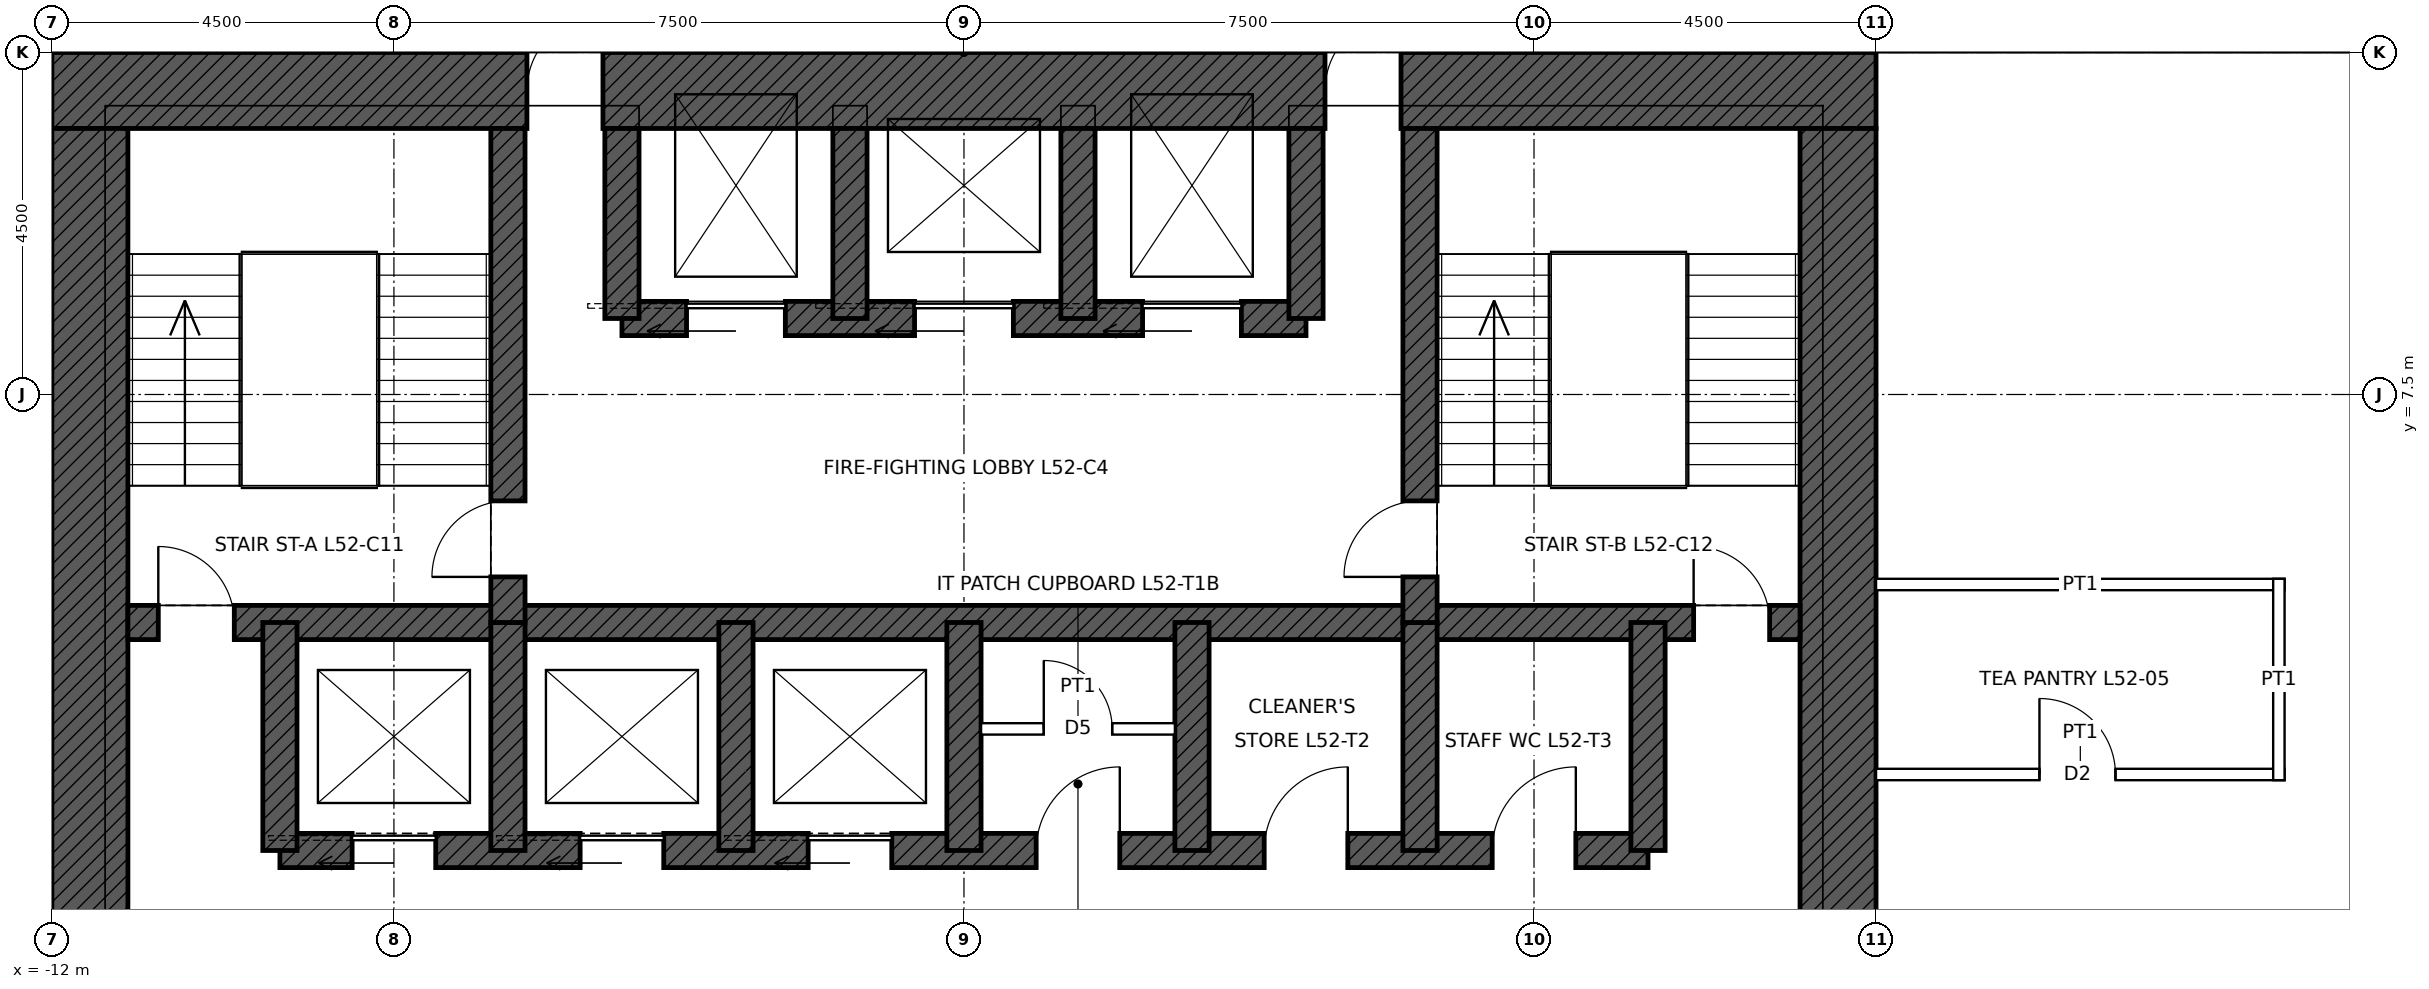
"""IFC4 building model, lengths in metres.
Left out: names, types, materials, properties, quantities, classifications, styles, units other than length and angle.
Written with IfcOpenShell. Run it as: python <this file> out.ifc"""

import sys

from ifc_helpers import new_model, si_unit, direction, frame, frame_2d, origin, place, context, subcontext, project, spatial, rectangle, extrude, element, fill, save


model = new_model("IFC4")
c1 = context("Model", 3, precision=1e-05, world=origin(), true_north=direction((0.0, 1.0)))
c2 = subcontext(c1, "Body", "Model", "MODEL_VIEW")
j1 = project(units=[si_unit("LENGTHUNIT", "METRE"), si_unit("PLANEANGLEUNIT", "RADIAN")], contexts=[c1])
p1 = place(None, origin())
s1 = spatial("IfcSite", under=j1, at=p1, CompositionType="ELEMENT")
p2 = place(p1, origin())
s2 = spatial("IfcBuilding", under=s1, at=p2, CompositionType="ELEMENT")
p3 = place(p2, frame((0.0, 0.0, 241.9)))
s3 = spatial("IfcBuildingStorey", under=s2, at=p3, CompositionType="ELEMENT", Elevation=241.9)
p4 = place(p3, frame((-12.0, 11.5, 0.0), z_axis=(0.0, 0.0, 1.0), x_axis=(1.0, 0.0, 0.0)))
e1 = element("IfcWall", 1, at=p4, inside=s3, PredefinedType="SHEAR", context=c2, shape_type="SweptSolid", body=[
    extrude(rectangle(XDim=24.0, YDim=1.0, at=frame_2d((12.0, 0.0))), origin(), (0.0, 0.0, 1.0), 4.0),
])
p5 = place(p4, frame((6.25, 0.0, 0.0)))
e2 = element("IfcOpeningElement", 2, at=p5, cuts=e1, PredefinedType="OPENING", context=c2, shape_type="SweptSolid", body=[
    extrude(rectangle(XDim=1.0, YDim=2.4, at=frame_2d((0.5, 1.2))), frame((0.0, 0.51, 0.0), z_axis=(0.0, -1.0, 0.0), x_axis=(1.0, 0.0, 0.0)), (0.0, 0.0, 1.0), 1.02),
])
p6 = place(p4, frame((16.75, 0.0, 0.0)))
e3 = element("IfcOpeningElement", 3, at=p6, cuts=e1, PredefinedType="OPENING", context=c2, shape_type="SweptSolid", body=[
    extrude(rectangle(XDim=1.0, YDim=2.4, at=frame_2d((0.5, 1.2))), frame((0.0, 0.51, 0.0), z_axis=(0.0, -1.0, 0.0), x_axis=(1.0, 0.0, 0.0)), (0.0, 0.0, 1.0), 1.02),
])
p7 = place(p3, frame((11.5, 11.0, 0.0), z_axis=(0.0, 0.0, 1.0), x_axis=(0.0, -1.0, 0.0)))
e4 = element("IfcWall", 4, at=p7, inside=s3, PredefinedType="SHEAR", context=c2, shape_type="SweptSolid", body=[
    extrude(rectangle(XDim=22.0, YDim=1.0, at=frame_2d((11.0, 0.0))), origin(), (0.0, 0.0, 1.0), 4.0),
])
p8 = place(p7, frame((10.5, 0.0, 0.0)))
e5 = element("IfcOpeningElement", 5, at=p8, cuts=e4, PredefinedType="OPENING", context=c2, shape_type="SweptSolid", body=[
    extrude(rectangle(XDim=1.0, YDim=2.4, at=frame_2d((0.5, 1.2))), frame((0.0, 0.51, 0.0), z_axis=(0.0, -1.0, 0.0), x_axis=(1.0, 0.0, 0.0)), (0.0, 0.0, 1.0), 1.02),
])
p9 = place(p3, frame((-11.5, -11.0, 0.0), z_axis=(0.0, 0.0, 1.0), x_axis=(0.0, 1.0, 0.0)))
e6 = element("IfcWall", 6, at=p9, inside=s3, PredefinedType="SHEAR", context=c2, shape_type="SweptSolid", body=[
    extrude(rectangle(XDim=22.0, YDim=1.0, at=frame_2d((11.0, 0.0))), origin(), (0.0, 0.0, 1.0), 4.0),
])
p10 = place(p9, frame((10.5, 0.0, 0.0)))
e7 = element("IfcOpeningElement", 7, at=p10, cuts=e6, PredefinedType="OPENING", context=c2, shape_type="SweptSolid", body=[
    extrude(rectangle(XDim=1.0, YDim=2.4, at=frame_2d((0.5, 1.2))), frame((0.0, 0.51, 0.0), z_axis=(0.0, -1.0, 0.0), x_axis=(1.0, 0.0, 0.0)), (0.0, 0.0, 1.0), 1.02),
])
p11 = place(p3, frame((-11.0, 4.5, 0.0), z_axis=(0.0, 0.0, 1.0), x_axis=(1.0, 0.0, 0.0)))
e8 = element("IfcWall", 8, at=p11, inside=s3, PredefinedType="SHEAR", context=c2, shape_type="SweptSolid", body=[
    extrude(rectangle(XDim=22.0, YDim=0.45, at=frame_2d((11.0, 0.0))), origin(), (0.0, 0.0, 1.0), 4.0),
])
p12 = place(p11, frame((0.4, 0.0, 0.0)))
e9 = element("IfcOpeningElement", 9, at=p12, cuts=e8, PredefinedType="OPENING", context=c2, shape_type="SweptSolid", body=[
    extrude(rectangle(XDim=1.0, YDim=2.1, at=frame_2d((0.5, 1.05))), frame((0.0, 0.235, 0.0), z_axis=(0.0, -1.0, 0.0), x_axis=(1.0, 0.0, 0.0)), (0.0, 0.0, 1.0), 0.47),
])
p13 = place(p11, frame((20.6, 0.0, 0.0)))
e10 = element("IfcOpeningElement", 10, at=p13, cuts=e8, PredefinedType="OPENING", context=c2, shape_type="SweptSolid", body=[
    extrude(rectangle(XDim=1.0, YDim=2.1, at=frame_2d((0.5, 1.05))), frame((0.0, 0.235, 0.0), z_axis=(0.0, -1.0, 0.0), x_axis=(1.0, 0.0, 0.0)), (0.0, 0.0, 1.0), 0.47),
])
p14 = place(p3, frame((-9.0, 1.5, 0.0), z_axis=(0.0, 0.0, 1.0), x_axis=(1.0, 0.0, 0.0)))
e11 = element("IfcWall", 11, at=p14, inside=s3, PredefinedType="SHEAR", context=c2, shape_type="SweptSolid", body=[
    extrude(rectangle(XDim=18.0, YDim=0.45, at=frame_2d((9.0, 0.0))), origin(), (0.0, 0.0, 1.0), 4.0),
])
p15 = place(p14, frame((0.95, 0.0, 0.0)))
e12 = element("IfcOpeningElement", 12, at=p15, cuts=e11, PredefinedType="OPENING", context=c2, shape_type="SweptSolid", body=[
    extrude(rectangle(XDim=1.1, YDim=2.1, at=frame_2d((0.55, 1.05))), frame((0.0, 0.235, 0.0), z_axis=(0.0, -1.0, 0.0), x_axis=(1.0, 0.0, 0.0)), (0.0, 0.0, 1.0), 0.47),
])
p16 = place(p14, frame((3.95, 0.0, 0.0)))
e13 = element("IfcOpeningElement", 13, at=p16, cuts=e11, PredefinedType="OPENING", context=c2, shape_type="SweptSolid", body=[
    extrude(rectangle(XDim=1.1, YDim=2.1, at=frame_2d((0.55, 1.05))), frame((0.0, 0.235, 0.0), z_axis=(0.0, -1.0, 0.0), x_axis=(1.0, 0.0, 0.0)), (0.0, 0.0, 1.0), 0.47),
])
p17 = place(p14, frame((6.95, 0.0, 0.0)))
e14 = element("IfcOpeningElement", 14, at=p17, cuts=e11, PredefinedType="OPENING", context=c2, shape_type="SweptSolid", body=[
    extrude(rectangle(XDim=1.1, YDim=2.1, at=frame_2d((0.55, 1.05))), frame((0.0, 0.235, 0.0), z_axis=(0.0, -1.0, 0.0), x_axis=(1.0, 0.0, 0.0)), (0.0, 0.0, 1.0), 0.47),
])
p18 = place(p14, frame((9.95, 0.0, 0.0)))
e15 = element("IfcOpeningElement", 15, at=p18, cuts=e11, PredefinedType="OPENING", context=c2, shape_type="SweptSolid", body=[
    extrude(rectangle(XDim=1.1, YDim=2.1, at=frame_2d((0.55, 1.05))), frame((0.0, 0.235, 0.0), z_axis=(0.0, -1.0, 0.0), x_axis=(1.0, 0.0, 0.0)), (0.0, 0.0, 1.0), 0.47),
])
p19 = place(p14, frame((12.95, 0.0, 0.0)))
e16 = element("IfcOpeningElement", 16, at=p19, cuts=e11, PredefinedType="OPENING", context=c2, shape_type="SweptSolid", body=[
    extrude(rectangle(XDim=1.1, YDim=2.1, at=frame_2d((0.55, 1.05))), frame((0.0, 0.235, 0.0), z_axis=(0.0, -1.0, 0.0), x_axis=(1.0, 0.0, 0.0)), (0.0, 0.0, 1.0), 0.47),
])
p20 = place(p14, frame((15.95, 0.0, 0.0)))
e17 = element("IfcOpeningElement", 17, at=p20, cuts=e11, PredefinedType="OPENING", context=c2, shape_type="SweptSolid", body=[
    extrude(rectangle(XDim=1.1, YDim=2.1, at=frame_2d((0.55, 1.05))), frame((0.0, 0.235, 0.0), z_axis=(0.0, -1.0, 0.0), x_axis=(1.0, 0.0, 0.0)), (0.0, 0.0, 1.0), 0.47),
])
p21 = place(p3, frame((-4.5, 8.5, 0.0), z_axis=(0.0, 0.0, 1.0), x_axis=(1.0, 0.0, 0.0)))
e18 = element("IfcWall", 18, at=p21, inside=s3, PredefinedType="SHEAR", context=c2, shape_type="SweptSolid", body=[
    extrude(rectangle(XDim=9.0, YDim=0.45, at=frame_2d((4.5, 0.0))), origin(), (0.0, 0.0, 1.0), 4.0),
])
p22 = place(p21, frame((0.85, 0.0, 0.0)))
e19 = element("IfcOpeningElement", 19, at=p22, cuts=e18, PredefinedType="OPENING", context=c2, shape_type="SweptSolid", body=[
    extrude(rectangle(XDim=1.3, YDim=2.4, at=frame_2d((0.65, 1.2))), frame((0.0, 0.235, 0.0), z_axis=(0.0, -1.0, 0.0), x_axis=(1.0, 0.0, 0.0)), (0.0, 0.0, 1.0), 0.47),
])
p23 = place(p21, frame((6.85, 0.0, 0.0)))
e20 = element("IfcOpeningElement", 20, at=p23, cuts=e18, PredefinedType="OPENING", context=c2, shape_type="SweptSolid", body=[
    extrude(rectangle(XDim=1.3, YDim=2.4, at=frame_2d((0.65, 1.2))), frame((0.0, 0.235, 0.0), z_axis=(0.0, -1.0, 0.0), x_axis=(1.0, 0.0, 0.0)), (0.0, 0.0, 1.0), 0.47),
])
p24 = place(p21, frame((3.85, 0.0, 0.0)))
e21 = element("IfcOpeningElement", 21, at=p24, cuts=e18, PredefinedType="OPENING", context=c2, shape_type="SweptSolid", body=[
    extrude(rectangle(XDim=1.3, YDim=2.4, at=frame_2d((0.65, 1.2))), frame((0.0, 0.235, 0.0), z_axis=(0.0, -1.0, 0.0), x_axis=(1.0, 0.0, 0.0)), (0.0, 0.0, 1.0), 0.47),
])
for number, where, z_axis, x_axis in (
    (22, (-9.0, 1.5, 0.0), (0.0, 0.0, 1.0), (0.0, 1.0, 0.0)),
    (23, (9.0, 1.5, 0.0), (0.0, 0.0, 1.0), (0.0, 1.0, 0.0)),
    (24, (-6.0, 1.5, 0.0), (0.0, 0.0, 1.0), (0.0, 1.0, 0.0)),
    (25, (-3.0, 1.5, 0.0), (0.0, 0.0, 1.0), (0.0, 1.0, 0.0)),
    (26, (0.0, 1.5, 0.0), (0.0, 0.0, 1.0), (0.0, 1.0, 0.0)),
    (27, (3.0, 1.5, 0.0), (0.0, 0.0, 1.0), (0.0, 1.0, 0.0)),
    (28, (6.0, 1.5, 0.0), (0.0, 0.0, 1.0), (0.0, 1.0, 0.0)),
):
    element("IfcWall", number, at=place(p3, frame(where, z_axis=z_axis, x_axis=x_axis)), inside=s3, PredefinedType="SHEAR", context=c2, shape_type="SweptSolid", body=[
        extrude(rectangle(XDim=3.0, YDim=0.45, at=frame_2d((1.5, 0.0))), origin(), (0.0, 0.0, 1.0), 4.0),
    ])
p25 = place(p3, frame((-6.0, 4.5, 0.0), z_axis=(0.0, 0.0, 1.0), x_axis=(0.0, 1.0, 0.0)))
e29 = element("IfcWall", 29, at=p25, inside=s3, PredefinedType="SHEAR", context=c2, shape_type="SweptSolid", body=[
    extrude(rectangle(XDim=6.5, YDim=0.45, at=frame_2d((3.25, 0.0))), origin(), (0.0, 0.0, 1.0), 4.0),
])
p26 = place(p25, frame((0.6, 0.0, 0.0)))
e30 = element("IfcOpeningElement", 30, at=p26, cuts=e29, PredefinedType="OPENING", context=c2, shape_type="SweptSolid", body=[
    extrude(rectangle(XDim=1.0, YDim=2.1, at=frame_2d((0.5, 1.05))), frame((0.0, 0.235, 0.0), z_axis=(0.0, -1.0, 0.0), x_axis=(1.0, 0.0, 0.0)), (0.0, 0.0, 1.0), 0.47),
])
p27 = place(p3, frame((6.0, 4.5, 0.0), z_axis=(0.0, 0.0, 1.0), x_axis=(0.0, 1.0, 0.0)))
e31 = element("IfcWall", 31, at=p27, inside=s3, PredefinedType="SHEAR", context=c2, shape_type="SweptSolid", body=[
    extrude(rectangle(XDim=6.5, YDim=0.45, at=frame_2d((3.25, 0.0))), origin(), (0.0, 0.0, 1.0), 4.0),
])
p28 = place(p27, frame((0.6, 0.0, 0.0)))
e32 = element("IfcOpeningElement", 32, at=p28, cuts=e31, PredefinedType="OPENING", context=c2, shape_type="SweptSolid", body=[
    extrude(rectangle(XDim=1.0, YDim=2.1, at=frame_2d((0.5, 1.05))), frame((0.0, 0.235, 0.0), z_axis=(0.0, -1.0, 0.0), x_axis=(1.0, 0.0, 0.0)), (0.0, 0.0, 1.0), 0.47),
])
for number, where, z_axis, x_axis in (
    (33, (-4.5, 8.5, 0.0), (0.0, 0.0, 1.0), (0.0, 1.0, 0.0)),
    (34, (4.5, 8.5, 0.0), (0.0, 0.0, 1.0), (0.0, 1.0, 0.0)),
    (35, (-1.5, 8.5, 0.0), (0.0, 0.0, 1.0), (0.0, 1.0, 0.0)),
    (36, (1.5, 8.5, 0.0), (0.0, 0.0, 1.0), (0.0, 1.0, 0.0)),
):
    element("IfcWall", number, at=place(p3, frame(where, z_axis=z_axis, x_axis=x_axis)), inside=s3, PredefinedType="SHEAR", context=c2, shape_type="SweptSolid", body=[
        extrude(rectangle(XDim=2.5, YDim=0.45, at=frame_2d((1.25, 0.0))), origin(), (0.0, 0.0, 1.0), 4.0),
    ])
p29 = place(p3, frame((12.0, 2.5, 0.0), z_axis=(0.0, 0.0, 1.0), x_axis=(1.0, 0.0, 0.0)))
e37 = element("IfcWall", 37, at=p29, inside=s3, PredefinedType="PARTITIONING", context=c2, shape_type="SweptSolid", body=[
    extrude(rectangle(XDim=5.375, YDim=0.15, at=frame_2d((2.688, 0.0))), origin(), (0.0, 0.0, 1.0), 3.85),
])
p30 = place(p29, frame((2.15, 0.0, 0.0)))
e38 = element("IfcOpeningElement", 38, at=p30, cuts=e37, PredefinedType="OPENING", context=c2, shape_type="SweptSolid", body=[
    extrude(rectangle(XDim=1.0, YDim=2.1, at=frame_2d((0.5, 1.05))), frame((0.0, 0.085, 0.0), z_axis=(0.0, -1.0, 0.0), x_axis=(1.0, 0.0, 0.0)), (0.0, 0.0, 1.0), 0.17),
])
p31 = place(p3, frame((12.0, 5.0, 0.0), z_axis=(0.0, 0.0, 1.0), x_axis=(1.0, 0.0, 0.0)))
e39 = element("IfcWall", 39, at=p31, inside=s3, PredefinedType="PARTITIONING", context=c2, shape_type="SweptSolid", body=[
    extrude(rectangle(XDim=5.375, YDim=0.15, at=frame_2d((2.688, 0.0))), origin(), (0.0, 0.0, 1.0), 3.85),
])
p32 = place(p3, frame((17.3, 2.425, 0.0), z_axis=(0.0, 0.0, 1.0), x_axis=(0.0, 1.0, 0.0)))
e40 = element("IfcWall", 40, at=p32, inside=s3, PredefinedType="PARTITIONING", context=c2, shape_type="SweptSolid", body=[
    extrude(rectangle(XDim=2.65, YDim=0.15, at=frame_2d((1.325, 0.0))), origin(), (0.0, 0.0, 1.0), 3.85),
])
p33 = place(p3, frame((0.225, 3.1, 0.0), z_axis=(0.0, 0.0, 1.0), x_axis=(1.0, 0.0, 0.0)))
e41 = element("IfcWall", 41, at=p33, inside=s3, PredefinedType="PARTITIONING", context=c2, shape_type="SweptSolid", body=[
    extrude(rectangle(XDim=2.55, YDim=0.15, at=frame_2d((1.275, 0.0))), origin(), (0.0, 0.0, 1.0), 3.75),
])
p34 = place(p33, frame((0.825, 0.0, 0.0)))
e42 = element("IfcOpeningElement", 42, at=p34, cuts=e41, PredefinedType="OPENING", context=c2, shape_type="SweptSolid", body=[
    extrude(rectangle(XDim=0.9, YDim=2.1, at=frame_2d((0.45, 1.05))), frame((0.0, 0.085, 0.0), z_axis=(0.0, -1.0, 0.0), x_axis=(1.0, 0.0, 0.0)), (0.0, 0.0, 1.0), 0.17),
])
p35 = place(p12, origin())
e43 = element("IfcDoor", 43, at=p35, inside=s3, OperationType="SINGLE_SWING_LEFT", PredefinedType="DOOR", context=c2, shape_type="SweptSolid", body=[
    extrude(rectangle(XDim=1.0, YDim=2.1, at=frame_2d((0.5, 1.05))), frame((0.0, 0.025, 0.0), z_axis=(0.0, -1.0, 0.0), x_axis=(1.0, 0.0, 0.0)), (0.0, 0.0, 1.0), 0.05),
])
fill(e9, e43)
p36 = place(p13, origin())
e44 = element("IfcDoor", 44, at=p36, inside=s3, OperationType="SINGLE_SWING_LEFT", PredefinedType="DOOR", context=c2, shape_type="SweptSolid", body=[
    extrude(rectangle(XDim=1.0, YDim=2.1, at=frame_2d((0.5, 1.05))), frame((0.0, 0.025, 0.0), z_axis=(0.0, -1.0, 0.0), x_axis=(1.0, 0.0, 0.0)), (0.0, 0.0, 1.0), 0.05),
])
fill(e10, e44)
p37 = place(p26, origin())
e45 = element("IfcDoor", 45, at=p37, inside=s3, OperationType="SINGLE_SWING_LEFT", PredefinedType="DOOR", context=c2, shape_type="SweptSolid", body=[
    extrude(rectangle(XDim=1.0, YDim=2.1, at=frame_2d((0.5, 1.05))), frame((0.0, 0.025, 0.0), z_axis=(0.0, -1.0, 0.0), x_axis=(1.0, 0.0, 0.0)), (0.0, 0.0, 1.0), 0.05),
])
fill(e30, e45)
p38 = place(p28, origin())
e46 = element("IfcDoor", 46, at=p38, inside=s3, OperationType="SINGLE_SWING_LEFT", PredefinedType="DOOR", context=c2, shape_type="SweptSolid", body=[
    extrude(rectangle(XDim=1.0, YDim=2.1, at=frame_2d((0.5, 1.05))), frame((0.0, 0.025, 0.0), z_axis=(0.0, -1.0, 0.0), x_axis=(1.0, 0.0, 0.0)), (0.0, 0.0, 1.0), 0.05),
])
fill(e32, e46)
p39 = place(p5, origin())
e47 = element("IfcDoor", 47, at=p39, inside=s3, OperationType="SINGLE_SWING_RIGHT", PredefinedType="DOOR", context=c2, shape_type="SweptSolid", body=[
    extrude(rectangle(XDim=1.0, YDim=2.4, at=frame_2d((0.5, 1.2))), frame((0.0, 0.485, 0.0), z_axis=(0.0, -1.0, 0.0), x_axis=(1.0, 0.0, 0.0)), (0.0, 0.0, 1.0), 0.05),
])
fill(e2, e47)
p40 = place(p6, origin())
e48 = element("IfcDoor", 48, at=p40, inside=s3, OperationType="SINGLE_SWING_RIGHT", PredefinedType="DOOR", context=c2, shape_type="SweptSolid", body=[
    extrude(rectangle(XDim=1.0, YDim=2.4, at=frame_2d((0.5, 1.2))), frame((0.0, 0.485, 0.0), z_axis=(0.0, -1.0, 0.0), x_axis=(1.0, 0.0, 0.0)), (0.0, 0.0, 1.0), 0.05),
])
fill(e3, e48)
p41 = place(p22, origin())
e49 = element("IfcDoor", 49, at=p41, inside=s3, OperationType="SLIDING_TO_LEFT", PredefinedType="DOOR", context=c2, shape_type="SweptSolid", body=[
    extrude(rectangle(XDim=1.3, YDim=2.4, at=frame_2d((0.65, 1.2))), frame((0.0, 0.025, 0.0), z_axis=(0.0, -1.0, 0.0), x_axis=(1.0, 0.0, 0.0)), (0.0, 0.0, 1.0), 0.05),
])
fill(e19, e49)
p42 = place(p23, origin())
e50 = element("IfcDoor", 50, at=p42, inside=s3, OperationType="SLIDING_TO_LEFT", PredefinedType="DOOR", context=c2, shape_type="SweptSolid", body=[
    extrude(rectangle(XDim=1.3, YDim=2.4, at=frame_2d((0.65, 1.2))), frame((0.0, 0.025, 0.0), z_axis=(0.0, -1.0, 0.0), x_axis=(1.0, 0.0, 0.0)), (0.0, 0.0, 1.0), 0.05),
])
fill(e20, e50)
p43 = place(p24, origin())
e51 = element("IfcDoor", 51, at=p43, inside=s3, OperationType="SLIDING_TO_LEFT", PredefinedType="DOOR", context=c2, shape_type="SweptSolid", body=[
    extrude(rectangle(XDim=1.3, YDim=2.4, at=frame_2d((0.65, 1.2))), frame((0.0, 0.025, 0.0), z_axis=(0.0, -1.0, 0.0), x_axis=(1.0, 0.0, 0.0)), (0.0, 0.0, 1.0), 0.05),
])
fill(e21, e51)
p44 = place(p15, origin())
e52 = element("IfcDoor", 52, at=p44, inside=s3, OperationType="SLIDING_TO_LEFT", PredefinedType="DOOR", context=c2, shape_type="SweptSolid", body=[
    extrude(rectangle(XDim=1.1, YDim=2.1, at=frame_2d((0.55, 1.05))), frame((0.0, 0.025, 0.0), z_axis=(0.0, -1.0, 0.0), x_axis=(1.0, 0.0, 0.0)), (0.0, 0.0, 1.0), 0.05),
])
fill(e12, e52)
p45 = place(p16, origin())
e53 = element("IfcDoor", 53, at=p45, inside=s3, OperationType="SLIDING_TO_LEFT", PredefinedType="DOOR", context=c2, shape_type="SweptSolid", body=[
    extrude(rectangle(XDim=1.1, YDim=2.1, at=frame_2d((0.55, 1.05))), frame((0.0, 0.025, 0.0), z_axis=(0.0, -1.0, 0.0), x_axis=(1.0, 0.0, 0.0)), (0.0, 0.0, 1.0), 0.05),
])
fill(e13, e53)
p46 = place(p17, origin())
e54 = element("IfcDoor", 54, at=p46, inside=s3, OperationType="SLIDING_TO_LEFT", PredefinedType="DOOR", context=c2, shape_type="SweptSolid", body=[
    extrude(rectangle(XDim=1.1, YDim=2.1, at=frame_2d((0.55, 1.05))), frame((0.0, 0.025, 0.0), z_axis=(0.0, -1.0, 0.0), x_axis=(1.0, 0.0, 0.0)), (0.0, 0.0, 1.0), 0.05),
])
fill(e14, e54)
p47 = place(p18, origin())
e55 = element("IfcDoor", 55, at=p47, inside=s3, OperationType="SINGLE_SWING_RIGHT", PredefinedType="DOOR", context=c2, shape_type="SweptSolid", body=[
    extrude(rectangle(XDim=1.1, YDim=2.1, at=frame_2d((0.55, 1.05))), frame((0.0, 0.025, 0.0), z_axis=(0.0, -1.0, 0.0), x_axis=(1.0, 0.0, 0.0)), (0.0, 0.0, 1.0), 0.05),
])
fill(e15, e55)
p48 = place(p34, origin())
e56 = element("IfcDoor", 56, at=p48, inside=s3, OperationType="SINGLE_SWING_LEFT", PredefinedType="DOOR", context=c2, shape_type="SweptSolid", body=[
    extrude(rectangle(XDim=0.9, YDim=2.1, at=frame_2d((0.45, 1.05))), frame((0.0, 0.025, 0.0), z_axis=(0.0, -1.0, 0.0), x_axis=(1.0, 0.0, 0.0)), (0.0, 0.0, 1.0), 0.05),
])
fill(e42, e56)
p49 = place(p19, origin())
e57 = element("IfcDoor", 57, at=p49, inside=s3, OperationType="SINGLE_SWING_RIGHT", PredefinedType="DOOR", context=c2, shape_type="SweptSolid", body=[
    extrude(rectangle(XDim=1.1, YDim=2.1, at=frame_2d((0.55, 1.05))), frame((0.0, 0.025, 0.0), z_axis=(0.0, -1.0, 0.0), x_axis=(1.0, 0.0, 0.0)), (0.0, 0.0, 1.0), 0.05),
])
fill(e16, e57)
p50 = place(p20, origin())
e58 = element("IfcDoor", 58, at=p50, inside=s3, OperationType="SINGLE_SWING_RIGHT", PredefinedType="DOOR", context=c2, shape_type="SweptSolid", body=[
    extrude(rectangle(XDim=1.1, YDim=2.1, at=frame_2d((0.55, 1.05))), frame((0.0, 0.025, 0.0), z_axis=(0.0, -1.0, 0.0), x_axis=(1.0, 0.0, 0.0)), (0.0, 0.0, 1.0), 0.05),
])
fill(e17, e58)
p51 = place(p30, origin())
e59 = element("IfcDoor", 59, at=p51, inside=s3, OperationType="SINGLE_SWING_LEFT", PredefinedType="DOOR", context=c2, shape_type="SweptSolid", body=[
    extrude(rectangle(XDim=1.0, YDim=2.1, at=frame_2d((0.5, 1.05))), frame((0.0, 0.025, 0.0), z_axis=(0.0, -1.0, 0.0), x_axis=(1.0, 0.0, 0.0)), (0.0, 0.0, 1.0), 0.05),
])
fill(e38, e59)
save(model, sys.argv[1])
